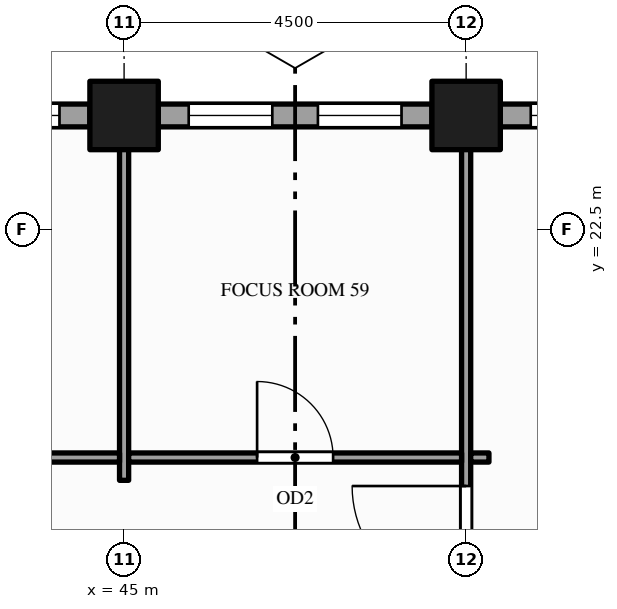
"""IFC4 building model, lengths in metres.
Left out: names, types, materials, properties, quantities, classifications, styles, units other than length and angle.
Written with IfcOpenShell. Run it as: python <this file> out.ifc"""

import sys

from ifc_helpers import new_model, si_unit, direction, frame, frame_2d, origin, origin_2d, place, context, subcontext, project, spatial, rectangle, hollow_rectangle, extrude, element, fill, save


model = new_model("IFC4")
c1 = context("Model", 3, precision=1e-05, world=origin(), true_north=direction((0.0, 1.0)))
c2 = subcontext(c1, "Body", "Model", "MODEL_VIEW")
j1 = project(units=[si_unit("LENGTHUNIT", "METRE"), si_unit("PLANEANGLEUNIT", "RADIAN")], contexts=[c1])
p1 = place(None, origin())
s1 = spatial("IfcSite", under=j1, at=p1, CompositionType="ELEMENT")
p2 = place(p1, origin())
s2 = spatial("IfcBuilding", under=s1, at=p2, CompositionType="ELEMENT")
p3 = place(p2, frame((0.0, 0.0, 179.0)))
s3 = spatial("IfcBuildingStorey", under=s2, at=p3, CompositionType="ELEMENT", Elevation=179.0)
for number, where, z_axis, x_axis in (
    (1, (45.0, 24.0, -0.15), (0.0, 0.0, 1.0), (1.0, 0.0, 0.0)),
    (2, (49.5, 24.0, -0.15), (0.0, 0.0, 1.0), (1.0, 0.0, 0.0)),
):
    element("IfcColumn", number, at=place(p3, frame(where, z_axis=z_axis, x_axis=x_axis)), inside=s3, PredefinedType="COLUMN", context=c2, shape_type="SweptSolid", body=[
        extrude(hollow_rectangle(XDim=0.9, YDim=0.9, WallThickness=0.045, at=origin_2d()), origin(), (0.0, 0.0, 1.0), 4.0),
    ])
p4 = place(p3, frame((53.55, 24.0, 0.0), z_axis=(0.0, 0.0, 1.0), x_axis=(-1.0, 0.0, 0.0)))
e3 = element("IfcWall", 3, at=p4, inside=s3, PredefinedType="STANDARD", context=c2, shape_type="SweptSolid", body=[
    extrude(rectangle(XDim=3.6, YDim=0.3, at=frame_2d((1.8, 0.0))), origin(), (0.0, 0.0, 1.0), 2.87),
])
p5 = place(p4, frame((0.4, 0.0, 0.9)))
e4 = element("IfcOpeningElement", 4, at=p5, cuts=e3, PredefinedType="OPENING", context=c2, shape_type="SweptSolid", body=[
    extrude(rectangle(XDim=1.1, YDim=1.75, at=frame_2d((0.55, 0.875))), frame((0.0, 0.16, 0.0), z_axis=(0.0, -1.0, 0.0), x_axis=(1.0, 0.0, 0.0)), (0.0, 0.0, 1.0), 0.32),
])
p6 = place(p4, frame((2.1, 0.0, 0.9)))
e5 = element("IfcOpeningElement", 5, at=p6, cuts=e3, PredefinedType="OPENING", context=c2, shape_type="SweptSolid", body=[
    extrude(rectangle(XDim=1.1, YDim=1.75, at=frame_2d((0.55, 0.875))), frame((0.0, 0.16, 0.0), z_axis=(0.0, -1.0, 0.0), x_axis=(1.0, 0.0, 0.0)), (0.0, 0.0, 1.0), 0.32),
])
p7 = place(p3, frame((49.05, 24.0, 0.0), z_axis=(0.0, 0.0, 1.0), x_axis=(-1.0, 0.0, 0.0)))
e6 = element("IfcWall", 6, at=p7, inside=s3, PredefinedType="STANDARD", context=c2, shape_type="SweptSolid", body=[
    extrude(rectangle(XDim=3.6, YDim=0.3, at=frame_2d((1.8, 0.0))), origin(), (0.0, 0.0, 1.0), 2.87),
])
p8 = place(p7, frame((0.4, 0.0, 0.9)))
e7 = element("IfcOpeningElement", 7, at=p8, cuts=e6, PredefinedType="OPENING", context=c2, shape_type="SweptSolid", body=[
    extrude(rectangle(XDim=1.1, YDim=1.75, at=frame_2d((0.55, 0.875))), frame((0.0, 0.16, 0.0), z_axis=(0.0, -1.0, 0.0), x_axis=(1.0, 0.0, 0.0)), (0.0, 0.0, 1.0), 0.32),
])
p9 = place(p7, frame((2.1, 0.0, 0.9)))
e8 = element("IfcOpeningElement", 8, at=p9, cuts=e6, PredefinedType="OPENING", context=c2, shape_type="SweptSolid", body=[
    extrude(rectangle(XDim=1.1, YDim=1.75, at=frame_2d((0.55, 0.875))), frame((0.0, 0.16, 0.0), z_axis=(0.0, -1.0, 0.0), x_axis=(1.0, 0.0, 0.0)), (0.0, 0.0, 1.0), 0.32),
])
p10 = place(p3, frame((44.55, 24.0, 0.0), z_axis=(0.0, 0.0, 1.0), x_axis=(-1.0, 0.0, 0.0)))
e9 = element("IfcWall", 9, at=p10, inside=s3, PredefinedType="STANDARD", context=c2, shape_type="SweptSolid", body=[
    extrude(rectangle(XDim=3.6, YDim=0.3, at=frame_2d((1.8, 0.0))), origin(), (0.0, 0.0, 1.0), 2.87),
])
p11 = place(p10, frame((0.4, 0.0, 0.9)))
e10 = element("IfcOpeningElement", 10, at=p11, cuts=e9, PredefinedType="OPENING", context=c2, shape_type="SweptSolid", body=[
    extrude(rectangle(XDim=1.1, YDim=1.75, at=frame_2d((0.55, 0.875))), frame((0.0, 0.16, 0.0), z_axis=(0.0, -1.0, 0.0), x_axis=(1.0, 0.0, 0.0)), (0.0, 0.0, 1.0), 0.32),
])
p12 = place(p10, frame((2.1, 0.0, 0.9)))
e11 = element("IfcOpeningElement", 11, at=p12, cuts=e9, PredefinedType="OPENING", context=c2, shape_type="SweptSolid", body=[
    extrude(rectangle(XDim=1.1, YDim=1.75, at=frame_2d((0.55, 0.875))), frame((0.0, 0.16, 0.0), z_axis=(0.0, -1.0, 0.0), x_axis=(1.0, 0.0, 0.0)), (0.0, 0.0, 1.0), 0.32),
])
p13 = place(p3, frame((45.0, 19.2, 0.0), z_axis=(0.0, 0.0, 1.0), x_axis=(0.0, 1.0, 0.0)))
e12 = element("IfcWall", 12, at=p13, inside=s3, PredefinedType="PARTITIONING", context=c2, shape_type="SweptSolid", body=[
    extrude(rectangle(XDim=4.65, YDim=0.12, at=frame_2d((2.325, 0.0))), origin(), (0.0, 0.0, 1.0), 2.87),
])
p14 = place(p3, frame((49.5, 1.65, 0.0), z_axis=(0.0, 0.0, 1.0), x_axis=(0.0, 1.0, 0.0)))
e13 = element("IfcWall", 13, at=p14, inside=s3, PredefinedType="PARTITIONING", context=c2, shape_type="SweptSolid", body=[
    extrude(rectangle(XDim=22.2, YDim=0.12, at=frame_2d((11.1, 0.0))), origin(), (0.0, 0.0, 1.0), 2.87),
])
p15 = place(p14, frame((4.725, 0.0, 0.0)))
e14 = element("IfcOpeningElement", 14, at=p15, cuts=e13, PredefinedType="OPENING", context=c2, shape_type="SweptSolid", body=[
    extrude(rectangle(XDim=1.5, YDim=2.1, at=frame_2d((0.75, 1.05))), frame((0.0, 0.07, 0.0), z_axis=(0.0, -1.0, 0.0), x_axis=(1.0, 0.0, 0.0)), (0.0, 0.0, 1.0), 0.14),
])
p16 = place(p14, frame((15.975, 0.0, 0.0)))
e15 = element("IfcOpeningElement", 15, at=p16, cuts=e13, PredefinedType="OPENING", context=c2, shape_type="SweptSolid", body=[
    extrude(rectangle(XDim=1.5, YDim=2.1, at=frame_2d((0.75, 1.05))), frame((0.0, 0.07, 0.0), z_axis=(0.0, -1.0, 0.0), x_axis=(1.0, 0.0, 0.0)), (0.0, 0.0, 1.0), 0.14),
])
p17 = place(p14, frame((7.6, 0.0, 0.0)))
e16 = element("IfcOpeningElement", 16, at=p17, cuts=e13, PredefinedType="OPENING", context=c2, shape_type="SweptSolid", body=[
    extrude(rectangle(XDim=0.9, YDim=2.1, at=frame_2d((0.45, 1.05))), frame((0.0, 0.07, 0.0), z_axis=(0.0, -1.0, 0.0), x_axis=(1.0, 0.0, 0.0)), (0.0, 0.0, 1.0), 0.14),
])
p18 = place(p14, frame((10.65, 0.0, 0.0)))
e17 = element("IfcOpeningElement", 17, at=p18, cuts=e13, PredefinedType="OPENING", context=c2, shape_type="SweptSolid", body=[
    extrude(rectangle(XDim=0.9, YDim=2.1, at=frame_2d((0.45, 1.05))), frame((0.0, 0.07, 0.0), z_axis=(0.0, -1.0, 0.0), x_axis=(1.0, 0.0, 0.0)), (0.0, 0.0, 1.0), 0.14),
])
p19 = place(p14, frame((13.6, 0.0, 0.0)))
e18 = element("IfcOpeningElement", 18, at=p19, cuts=e13, PredefinedType="OPENING", context=c2, shape_type="SweptSolid", body=[
    extrude(rectangle(XDim=1.0, YDim=2.1, at=frame_2d((0.5, 1.05))), frame((0.0, 0.07, 0.0), z_axis=(0.0, -1.0, 0.0), x_axis=(1.0, 0.0, 0.0)), (0.0, 0.0, 1.0), 0.14),
])
p20 = place(p3, frame((40.56, 19.5, 0.0), z_axis=(0.0, 0.0, 1.0), x_axis=(1.0, 0.0, 0.0)))
e19 = element("IfcWall", 19, at=p20, inside=s3, PredefinedType="PARTITIONING", context=c2, shape_type="SweptSolid", body=[
    extrude(rectangle(XDim=4.38, YDim=0.12, at=frame_2d((2.19, 0.0))), origin(), (0.0, 0.0, 1.0), 2.87),
])
p21 = place(p20, frame((1.69, 0.0, 0.0)))
e20 = element("IfcOpeningElement", 20, at=p21, cuts=e19, PredefinedType="OPENING", context=c2, shape_type="SweptSolid", body=[
    extrude(rectangle(XDim=1.0, YDim=2.1, at=frame_2d((0.5, 1.05))), frame((0.0, 0.07, 0.0), z_axis=(0.0, -1.0, 0.0), x_axis=(1.0, 0.0, 0.0)), (0.0, 0.0, 1.0), 0.14),
])
p22 = place(p3, frame((45.06, 19.5, 0.0), z_axis=(0.0, 0.0, 1.0), x_axis=(1.0, 0.0, 0.0)))
e21 = element("IfcWall", 21, at=p22, inside=s3, PredefinedType="PARTITIONING", context=c2, shape_type="SweptSolid", body=[
    extrude(rectangle(XDim=4.38, YDim=0.12, at=frame_2d((2.19, 0.0))), origin(), (0.0, 0.0, 1.0), 2.87),
])
p23 = place(p22, frame((1.69, 0.0, 0.0)))
e22 = element("IfcOpeningElement", 22, at=p23, cuts=e21, PredefinedType="OPENING", context=c2, shape_type="SweptSolid", body=[
    extrude(rectangle(XDim=1.0, YDim=2.1, at=frame_2d((0.5, 1.05))), frame((0.0, 0.07, 0.0), z_axis=(0.0, -1.0, 0.0), x_axis=(1.0, 0.0, 0.0)), (0.0, 0.0, 1.0), 0.14),
])
p24 = place(p3, frame((49.56, 19.5, 0.0), z_axis=(0.0, 0.0, 1.0), x_axis=(1.0, 0.0, 0.0)))
e23 = element("IfcWall", 23, at=p24, inside=s3, PredefinedType="PARTITIONING", context=c2, shape_type="SweptSolid", body=[
    extrude(rectangle(XDim=0.24, YDim=0.12, at=frame_2d((0.12, 0.0))), origin(), (0.0, 0.0, 1.0), 2.87),
])
p25 = place(p6, origin())
e24 = element("IfcWindow", 24, at=p25, inside=s3, PartitioningType="SINGLE_PANEL", PredefinedType="WINDOW", context=c2, shape_type="SweptSolid", body=[
    extrude(rectangle(XDim=1.1, YDim=1.75, at=frame_2d((0.55, 0.875))), frame((0.0, 0.03, 0.0), z_axis=(0.0, -1.0, 0.0), x_axis=(1.0, 0.0, 0.0)), (0.0, 0.0, 1.0), 0.06),
])
fill(e5, e24)
p26 = place(p8, origin())
e25 = element("IfcWindow", 25, at=p26, inside=s3, PartitioningType="SINGLE_PANEL", PredefinedType="WINDOW", context=c2, shape_type="SweptSolid", body=[
    extrude(rectangle(XDim=1.1, YDim=1.75, at=frame_2d((0.55, 0.875))), frame((0.0, 0.03, 0.0), z_axis=(0.0, -1.0, 0.0), x_axis=(1.0, 0.0, 0.0)), (0.0, 0.0, 1.0), 0.06),
])
fill(e7, e25)
p27 = place(p9, origin())
e26 = element("IfcWindow", 26, at=p27, inside=s3, PartitioningType="SINGLE_PANEL", PredefinedType="WINDOW", context=c2, shape_type="SweptSolid", body=[
    extrude(rectangle(XDim=1.1, YDim=1.75, at=frame_2d((0.55, 0.875))), frame((0.0, 0.03, 0.0), z_axis=(0.0, -1.0, 0.0), x_axis=(1.0, 0.0, 0.0)), (0.0, 0.0, 1.0), 0.06),
])
fill(e8, e26)
p28 = place(p11, origin())
e27 = element("IfcWindow", 27, at=p28, inside=s3, PartitioningType="SINGLE_PANEL", PredefinedType="WINDOW", context=c2, shape_type="SweptSolid", body=[
    extrude(rectangle(XDim=1.1, YDim=1.75, at=frame_2d((0.55, 0.875))), frame((0.0, 0.03, 0.0), z_axis=(0.0, -1.0, 0.0), x_axis=(1.0, 0.0, 0.0)), (0.0, 0.0, 1.0), 0.06),
])
fill(e10, e27)
p29 = place(p16, origin())
e28 = element("IfcDoor", 28, at=p29, inside=s3, OperationType="SINGLE_SWING_RIGHT", PredefinedType="DOOR", context=c2, shape_type="SweptSolid", body=[
    extrude(rectangle(XDim=1.5, YDim=2.1, at=frame_2d((0.75, 1.05))), frame((0.0, 0.025, 0.0), z_axis=(0.0, -1.0, 0.0), x_axis=(1.0, 0.0, 0.0)), (0.0, 0.0, 1.0), 0.05),
])
fill(e15, e28)
p30 = place(p23, origin())
e29 = element("IfcDoor", 29, at=p30, inside=s3, OperationType="SINGLE_SWING_LEFT", PredefinedType="DOOR", context=c2, shape_type="SweptSolid", body=[
    extrude(rectangle(XDim=1.0, YDim=2.1, at=frame_2d((0.5, 1.05))), frame((0.0, 0.025, 0.0), z_axis=(0.0, -1.0, 0.0), x_axis=(1.0, 0.0, 0.0)), (0.0, 0.0, 1.0), 0.05),
])
fill(e22, e29)
save(model, sys.argv[1])
